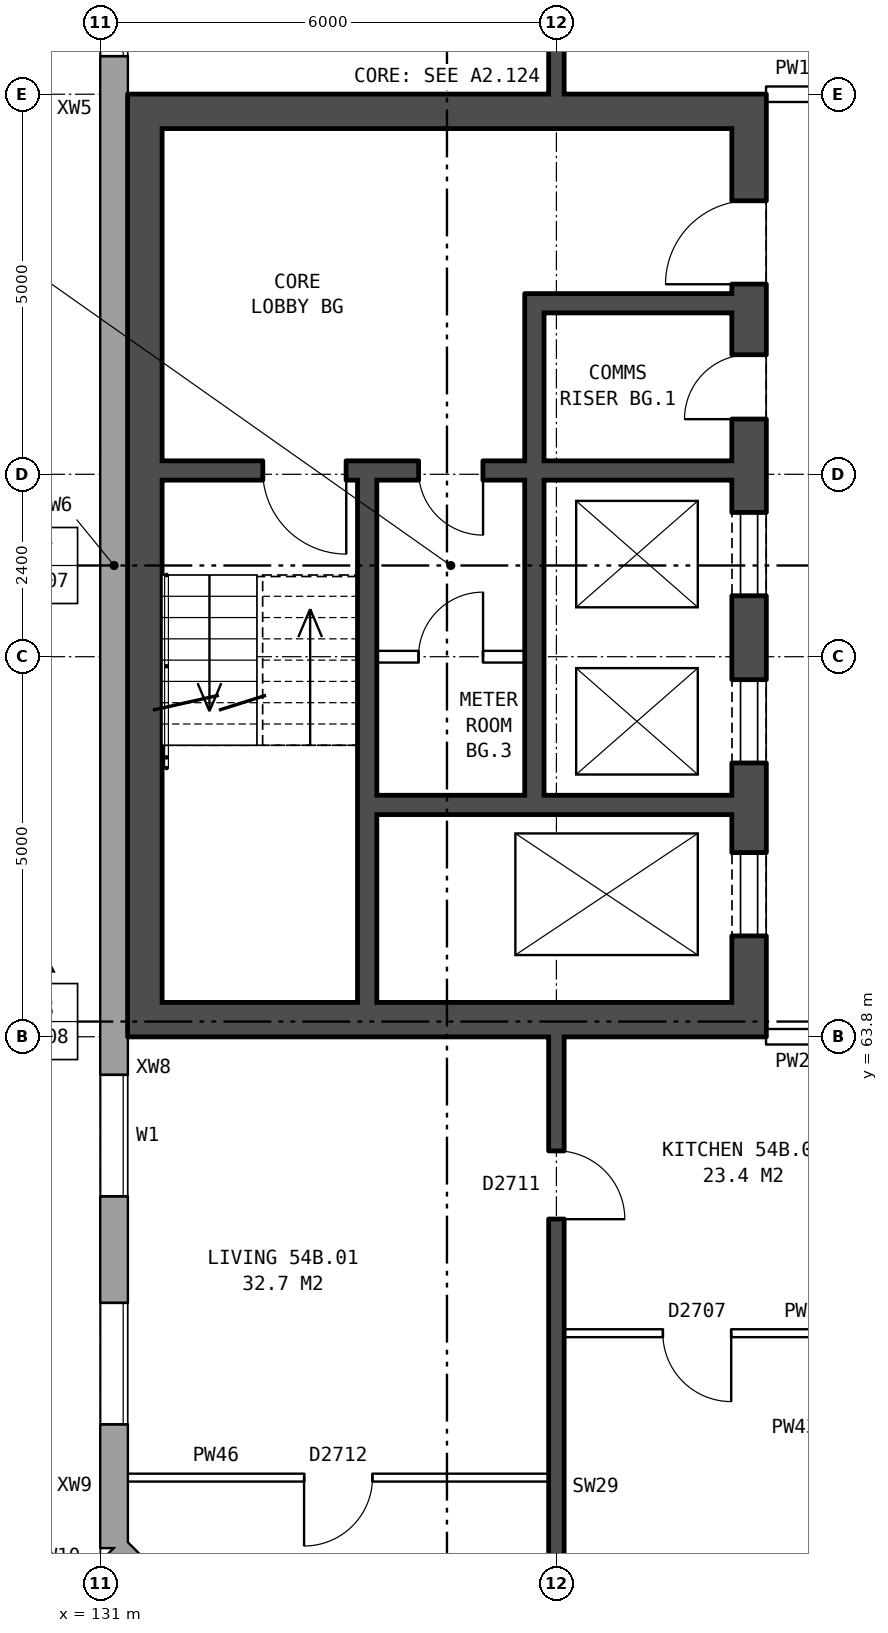
"""IFC4 building model, lengths in metres.
Left out: names, types, materials, properties, quantities, classifications, styles, units other than length and angle.
Written with IfcOpenShell. Run it as: python <this file> out.ifc"""

import sys

from ifc_helpers import new_model, si_unit, direction, frame, frame_2d, origin, place, context, subcontext, project, spatial, rectangle, extrude, element, fill, save


model = new_model("IFC4")
c1 = context("Model", 3, precision=1e-05, world=origin(), true_north=direction((0.0, 1.0)))
c2 = subcontext(c1, "Body", "Model", "MODEL_VIEW")
j1 = project(units=[si_unit("LENGTHUNIT", "METRE"), si_unit("PLANEANGLEUNIT", "RADIAN")], contexts=[c1])
p1 = place(None, origin())
s1 = spatial("IfcSite", under=j1, at=p1, CompositionType="ELEMENT")
p2 = place(p1, origin())
s2 = spatial("IfcBuilding", under=s1, at=p2, CompositionType="ELEMENT")
p3 = place(p2, frame((0.0, 0.0, 191.3)))
s3 = spatial("IfcBuildingStorey", under=s2, at=p3, CompositionType="ELEMENT", Elevation=191.3)
p4 = place(p3, frame((131.18, 57.075, 0.0), z_axis=(0.0, 0.0, 1.0), x_axis=(0.707106781187, -0.707106781187, 0.0)))
e1 = element("IfcWall", 1, at=p4, inside=s3, PredefinedType="STANDARD", context=c2, shape_type="SweptSolid", body=[
    extrude(rectangle(XDim=4.094, YDim=0.36, at=frame_2d((2.047, 0.0))), origin(), (0.0, 0.0, 1.0), 2.85),
])
p5 = place(p4, frame((1.247, 0.0, 0.8)))
e2 = element("IfcOpeningElement", 2, at=p5, cuts=e1, PredefinedType="OPENING", context=c2, shape_type="SweptSolid", body=[
    extrude(rectangle(XDim=1.6, YDim=1.8, at=frame_2d((0.8, 0.9))), frame((0.0, 0.19, 0.0), z_axis=(0.0, -1.0, 0.0), x_axis=(1.0, 0.0, 0.0)), (0.0, 0.0, 1.0), 0.38),
])
p6 = place(p3, frame((131.18, 82.925, 0.0), z_axis=(0.0, 0.0, 1.0), x_axis=(0.0, -1.0, 0.0)))
e3 = element("IfcWall", 3, at=p6, inside=s3, PredefinedType="STANDARD", context=c2, shape_type="SweptSolid", body=[
    extrude(rectangle(XDim=6.522, YDim=0.36, at=frame_2d((3.261, 0.0))), origin(), (0.0, 0.0, 1.0), 2.85),
])
p7 = place(p6, frame((1.625, 0.0, 0.8)))
e4 = element("IfcOpeningElement", 4, at=p7, cuts=e3, PredefinedType="OPENING", context=c2, shape_type="SweptSolid", body=[
    extrude(rectangle(XDim=1.6, YDim=1.8, at=frame_2d((0.8, 0.9))), frame((0.0, 0.19, 0.0), z_axis=(0.0, -1.0, 0.0), x_axis=(1.0, 0.0, 0.0)), (0.0, 0.0, 1.0), 0.38),
])
p8 = place(p6, frame((4.625, 0.0, 0.8)))
e5 = element("IfcOpeningElement", 5, at=p8, cuts=e3, PredefinedType="OPENING", context=c2, shape_type="SweptSolid", body=[
    extrude(rectangle(XDim=1.6, YDim=1.8, at=frame_2d((0.8, 0.9))), frame((0.0, 0.19, 0.0), z_axis=(0.0, -1.0, 0.0), x_axis=(1.0, 0.0, 0.0)), (0.0, 0.0, 1.0), 0.38),
])
p9 = place(p3, frame((131.18, 76.403, 0.0), z_axis=(0.0, 0.0, 1.0), x_axis=(0.0, -1.0, 0.0)))
e6 = element("IfcWall", 6, at=p9, inside=s3, PredefinedType="STANDARD", context=c2, shape_type="SweptSolid", body=[
    extrude(rectangle(XDim=0.806, YDim=0.36, at=frame_2d((0.403, 0.0))), origin(), (0.0, 0.0, 1.0), 1.947),
])
p10 = place(p3, frame((131.18, 75.597, 0.0), z_axis=(0.0, 0.0, 1.0), x_axis=(0.0, -1.0, 0.0)))
e7 = element("IfcWall", 7, at=p10, inside=s3, PredefinedType="STANDARD", context=c2, shape_type="SweptSolid", body=[
    extrude(rectangle(XDim=11.194, YDim=0.36, at=frame_2d((5.597, 0.0))), origin(), (0.0, 0.0, 1.0), 2.85),
])
p11 = place(p3, frame((131.18, 64.403, 0.0), z_axis=(0.0, 0.0, 1.0), x_axis=(0.0, -1.0, 0.0)))
e8 = element("IfcWall", 8, at=p11, inside=s3, PredefinedType="STANDARD", context=c2, shape_type="SweptSolid", body=[
    extrude(rectangle(XDim=0.806, YDim=0.36, at=frame_2d((0.403, 0.0))), origin(), (0.0, 0.0, 1.0), 1.947),
])
p12 = place(p3, frame((131.18, 63.597, 0.0), z_axis=(0.0, 0.0, 1.0), x_axis=(0.0, -1.0, 0.0)))
e9 = element("IfcWall", 9, at=p12, inside=s3, PredefinedType="STANDARD", context=c2, shape_type="SweptSolid", body=[
    extrude(rectangle(XDim=6.522, YDim=0.36, at=frame_2d((3.261, 0.0))), origin(), (0.0, 0.0, 1.0), 2.85),
])
p13 = place(p12, frame((0.297, 0.0, 0.8)))
e10 = element("IfcOpeningElement", 10, at=p13, cuts=e9, PredefinedType="OPENING", context=c2, shape_type="SweptSolid", body=[
    extrude(rectangle(XDim=1.6, YDim=1.8, at=frame_2d((0.8, 0.9))), frame((0.0, 0.19, 0.0), z_axis=(0.0, -1.0, 0.0), x_axis=(1.0, 0.0, 0.0)), (0.0, 0.0, 1.0), 0.38),
])
p14 = place(p12, frame((3.297, 0.0, 0.8)))
e11 = element("IfcOpeningElement", 11, at=p14, cuts=e9, PredefinedType="OPENING", context=c2, shape_type="SweptSolid", body=[
    extrude(rectangle(XDim=1.6, YDim=1.8, at=frame_2d((0.8, 0.9))), frame((0.0, 0.19, 0.0), z_axis=(0.0, -1.0, 0.0), x_axis=(1.0, 0.0, 0.0)), (0.0, 0.0, 1.0), 0.38),
])
p15 = place(p3, frame((139.535, 63.8, 0.0), z_axis=(0.0, 0.0, 1.0), x_axis=(0.0, 1.0, 0.0)))
e12 = element("IfcWall", 12, at=p15, inside=s3, PredefinedType="SHEAR", context=c2, shape_type="SweptSolid", body=[
    extrude(rectangle(XDim=12.4, YDim=0.45, at=frame_2d((6.2, 0.0))), origin(), (0.0, 0.0, 1.0), 2.85),
])
p16 = place(p15, frame((1.325, 0.0, 0.0)))
e13 = element("IfcOpeningElement", 13, at=p16, cuts=e12, PredefinedType="OPENING", context=c2, shape_type="SweptSolid", body=[
    extrude(rectangle(XDim=1.1, YDim=2.1, at=frame_2d((0.55, 1.05))), frame((0.0, 0.235, 0.0), z_axis=(0.0, -1.0, 0.0), x_axis=(1.0, 0.0, 0.0)), (0.0, 0.0, 1.0), 0.47),
])
p17 = place(p15, frame((3.6, 0.0, 0.0)))
e14 = element("IfcOpeningElement", 14, at=p17, cuts=e12, PredefinedType="OPENING", context=c2, shape_type="SweptSolid", body=[
    extrude(rectangle(XDim=1.1, YDim=2.1, at=frame_2d((0.55, 1.05))), frame((0.0, 0.235, 0.0), z_axis=(0.0, -1.0, 0.0), x_axis=(1.0, 0.0, 0.0)), (0.0, 0.0, 1.0), 0.47),
])
p18 = place(p15, frame((5.8, 0.0, 0.0)))
e15 = element("IfcOpeningElement", 15, at=p18, cuts=e12, PredefinedType="OPENING", context=c2, shape_type="SweptSolid", body=[
    extrude(rectangle(XDim=1.1, YDim=2.1, at=frame_2d((0.55, 1.05))), frame((0.0, 0.235, 0.0), z_axis=(0.0, -1.0, 0.0), x_axis=(1.0, 0.0, 0.0)), (0.0, 0.0, 1.0), 0.47),
])
p19 = place(p15, frame((9.9, 0.0, 0.0)))
e16 = element("IfcOpeningElement", 16, at=p19, cuts=e12, PredefinedType="OPENING", context=c2, shape_type="SweptSolid", body=[
    extrude(rectangle(XDim=1.1, YDim=2.1, at=frame_2d((0.55, 1.05))), frame((0.0, 0.235, 0.0), z_axis=(0.0, -1.0, 0.0), x_axis=(1.0, 0.0, 0.0)), (0.0, 0.0, 1.0), 0.47),
])
p20 = place(p15, frame((8.125, 0.0, 0.0)))
e17 = element("IfcOpeningElement", 17, at=p20, cuts=e12, PredefinedType="OPENING", context=c2, shape_type="SweptSolid", body=[
    extrude(rectangle(XDim=0.85, YDim=2.1, at=frame_2d((0.425, 1.05))), frame((0.0, 0.235, 0.0), z_axis=(0.0, -1.0, 0.0), x_axis=(1.0, 0.0, 0.0)), (0.0, 0.0, 1.0), 0.47),
])
p21 = place(p3, frame((131.585, 63.8, 0.0), z_axis=(0.0, 0.0, 1.0), x_axis=(0.0, 1.0, 0.0)))
e18 = element("IfcWall", 18, at=p21, inside=s3, PredefinedType="SHEAR", context=c2, shape_type="SweptSolid", body=[
    extrude(rectangle(XDim=12.4, YDim=0.45, at=frame_2d((6.2, 0.0))), origin(), (0.0, 0.0, 1.0), 2.85),
])
for number, where, z_axis, x_axis in (
    (19, (139.31, 64.025, 0.0), (0.0, 0.0, 1.0), (-1.0, 0.0, 0.0)),
    (20, (139.31, 75.975, 0.0), (0.0, 0.0, 1.0), (-1.0, 0.0, 0.0)),
):
    element("IfcWall", number, at=place(p3, frame(where, z_axis=z_axis, x_axis=x_axis)), inside=s3, PredefinedType="SHEAR", context=c2, shape_type="SweptSolid", body=[
        extrude(rectangle(XDim=7.5, YDim=0.45, at=frame_2d((3.75, 0.0))), origin(), (0.0, 0.0, 1.0), 2.85),
    ])
p22 = place(p3, frame((139.31, 66.85, 0.0), z_axis=(0.0, 0.0, 1.0), x_axis=(-1.0, 0.0, 0.0)))
e21 = element("IfcWall", 21, at=p22, inside=s3, PredefinedType="SHEAR", context=c2, shape_type="SweptSolid", body=[
    extrude(rectangle(XDim=4.675, YDim=0.25, at=frame_2d((2.337, 0.0))), origin(), (0.0, 0.0, 1.0), 2.85),
])
p23 = place(p3, frame((136.585, 68.8, 0.0), z_axis=(0.0, 0.0, 1.0), x_axis=(-1.0, 0.0, 0.0)))
e22 = element("IfcWall", 22, at=p23, inside=s3, PredefinedType="PARTITIONING", context=c2, shape_type="SweptSolid", body=[
    extrude(rectangle(XDim=1.95, YDim=0.15, at=frame_2d((0.975, 0.0))), origin(), (0.0, 0.0, 1.0), 2.85),
])
p24 = place(p23, frame((0.55, 0.0, 0.0)))
e23 = element("IfcOpeningElement", 23, at=p24, cuts=e22, PredefinedType="OPENING", context=c2, shape_type="SweptSolid", body=[
    extrude(rectangle(XDim=0.85, YDim=2.1, at=frame_2d((0.425, 1.05))), frame((0.0, 0.085, 0.0), z_axis=(0.0, -1.0, 0.0), x_axis=(1.0, 0.0, 0.0)), (0.0, 0.0, 1.0), 0.17),
])
p25 = place(p3, frame((139.31, 71.25, 0.0), z_axis=(0.0, 0.0, 1.0), x_axis=(-1.0, 0.0, 0.0)))
e24 = element("IfcWall", 24, at=p25, inside=s3, PredefinedType="SHEAR", context=c2, shape_type="SweptSolid", body=[
    extrude(rectangle(XDim=7.5, YDim=0.25, at=frame_2d((3.75, 0.0))), origin(), (0.0, 0.0, 1.0), 2.85),
])
p26 = place(p25, frame((5.075, 0.0, 0.0)))
e25 = element("IfcOpeningElement", 25, at=p26, cuts=e24, PredefinedType="OPENING", context=c2, shape_type="SweptSolid", body=[
    extrude(rectangle(XDim=1.1, YDim=2.1, at=frame_2d((0.55, 1.05))), frame((0.0, 0.135, 0.0), z_axis=(0.0, -1.0, 0.0), x_axis=(1.0, 0.0, 0.0)), (0.0, 0.0, 1.0), 0.27),
])
p27 = place(p25, frame((3.275, 0.0, 0.0)))
e26 = element("IfcOpeningElement", 26, at=p27, cuts=e24, PredefinedType="OPENING", context=c2, shape_type="SweptSolid", body=[
    extrude(rectangle(XDim=0.85, YDim=2.1, at=frame_2d((0.425, 1.05))), frame((0.0, 0.135, 0.0), z_axis=(0.0, -1.0, 0.0), x_axis=(1.0, 0.0, 0.0)), (0.0, 0.0, 1.0), 0.27),
])
p28 = place(p3, frame((139.31, 73.45, 0.0), z_axis=(0.0, 0.0, 1.0), x_axis=(-1.0, 0.0, 0.0)))
e27 = element("IfcWall", 27, at=p28, inside=s3, PredefinedType="SHEAR", context=c2, shape_type="SweptSolid", body=[
    extrude(rectangle(XDim=2.475, YDim=0.25, at=frame_2d((1.238, 0.0))), origin(), (0.0, 0.0, 1.0), 2.85),
])
p29 = place(p3, frame((136.71, 66.975, 0.0), z_axis=(0.0, 0.0, 1.0), x_axis=(0.0, 1.0, 0.0)))
e28 = element("IfcWall", 28, at=p29, inside=s3, PredefinedType="SHEAR", context=c2, shape_type="SweptSolid", body=[
    extrude(rectangle(XDim=4.15, YDim=0.25, at=frame_2d((2.075, 0.0))), origin(), (0.0, 0.0, 1.0), 2.85),
])
p30 = place(p3, frame((136.71, 71.375, 0.0), z_axis=(0.0, 0.0, 1.0), x_axis=(0.0, 1.0, 0.0)))
e29 = element("IfcWall", 29, at=p30, inside=s3, PredefinedType="SHEAR", context=c2, shape_type="SweptSolid", body=[
    extrude(rectangle(XDim=2.2, YDim=0.25, at=frame_2d((1.1, 0.0))), origin(), (0.0, 0.0, 1.0), 2.85),
])
p31 = place(p3, frame((134.51, 64.25, 0.0), z_axis=(0.0, 0.0, 1.0), x_axis=(0.0, 1.0, 0.0)))
e30 = element("IfcWall", 30, at=p31, inside=s3, PredefinedType="SHEAR", context=c2, shape_type="SweptSolid", body=[
    extrude(rectangle(XDim=6.875, YDim=0.25, at=frame_2d((3.438, 0.0))), origin(), (0.0, 0.0, 1.0), 2.85),
])
p32 = place(p3, frame((131.36, 58.0, 0.0), z_axis=(0.0, 0.0, 1.0), x_axis=(1.0, 0.0, 0.0)))
e31 = element("IfcWall", 31, at=p32, inside=s3, PredefinedType="PARTITIONING", context=c2, shape_type="SweptSolid", body=[
    extrude(rectangle(XDim=5.54, YDim=0.1, at=frame_2d((2.77, 0.0))), origin(), (0.0, 0.0, 1.0), 2.85),
])
p33 = place(p32, frame((2.32, 0.0, 0.0)))
e32 = element("IfcOpeningElement", 32, at=p33, cuts=e31, PredefinedType="OPENING", context=c2, shape_type="SweptSolid", body=[
    extrude(rectangle(XDim=0.9, YDim=2.1, at=frame_2d((0.45, 1.05))), frame((0.0, 0.06, 0.0), z_axis=(0.0, -1.0, 0.0), x_axis=(1.0, 0.0, 0.0)), (0.0, 0.0, 1.0), 0.12),
])
p34 = place(p3, frame((137.1, 59.9, 0.0), z_axis=(0.0, 0.0, 1.0), x_axis=(1.0, 0.0, 0.0)))
e33 = element("IfcWall", 33, at=p34, inside=s3, PredefinedType="PARTITIONING", context=c2, shape_type="SweptSolid", body=[
    extrude(rectangle(XDim=5.8, YDim=0.1, at=frame_2d((2.9, 0.0))), origin(), (0.0, 0.0, 1.0), 2.85),
])
p35 = place(p34, frame((1.3, 0.0, 0.0)))
e34 = element("IfcOpeningElement", 34, at=p35, cuts=e33, PredefinedType="OPENING", context=c2, shape_type="SweptSolid", body=[
    extrude(rectangle(XDim=0.9, YDim=2.1, at=frame_2d((0.45, 1.05))), frame((0.0, 0.06, 0.0), z_axis=(0.0, -1.0, 0.0), x_axis=(1.0, 0.0, 0.0)), (0.0, 0.0, 1.0), 0.12),
])
p36 = place(p34, frame((4.2, 0.0, 0.0)))
e35 = element("IfcOpeningElement", 35, at=p36, cuts=e33, PredefinedType="OPENING", context=c2, shape_type="SweptSolid", body=[
    extrude(rectangle(XDim=0.9, YDim=2.1, at=frame_2d((0.45, 1.05))), frame((0.0, 0.06, 0.0), z_axis=(0.0, -1.0, 0.0), x_axis=(1.0, 0.0, 0.0)), (0.0, 0.0, 1.0), 0.12),
])
p37 = place(p3, frame((139.76, 63.8, 0.0), z_axis=(0.0, 0.0, 1.0), x_axis=(1.0, 0.0, 0.0)))
e36 = element("IfcWall", 36, at=p37, inside=s3, PredefinedType="PARTITIONING", context=c2, shape_type="SweptSolid", body=[
    extrude(rectangle(XDim=3.0, YDim=0.2, at=frame_2d((1.5, 0.0))), origin(), (0.0, 0.0, 1.0), 2.85),
])
p38 = place(p37, frame((1.0, 0.0, 0.0)))
e37 = element("IfcOpeningElement", 37, at=p38, cuts=e36, PredefinedType="OPENING", context=c2, shape_type="SweptSolid", body=[
    extrude(rectangle(XDim=1.0, YDim=2.1, at=frame_2d((0.5, 1.05))), frame((0.0, 0.11, 0.0), z_axis=(0.0, -1.0, 0.0), x_axis=(1.0, 0.0, 0.0)), (0.0, 0.0, 1.0), 0.22),
])
p39 = place(p3, frame((139.76, 76.2, 0.0), z_axis=(0.0, 0.0, 1.0), x_axis=(1.0, 0.0, 0.0)))
e38 = element("IfcWall", 38, at=p39, inside=s3, PredefinedType="PARTITIONING", context=c2, shape_type="SweptSolid", body=[
    extrude(rectangle(XDim=3.0, YDim=0.2, at=frame_2d((1.5, 0.0))), origin(), (0.0, 0.0, 1.0), 2.85),
])
p40 = place(p39, frame((1.0, 0.0, 0.0)))
e39 = element("IfcOpeningElement", 39, at=p40, cuts=e38, PredefinedType="OPENING", context=c2, shape_type="SweptSolid", body=[
    extrude(rectangle(XDim=1.0, YDim=2.1, at=frame_2d((0.5, 1.05))), frame((0.0, 0.11, 0.0), z_axis=(0.0, -1.0, 0.0), x_axis=(1.0, 0.0, 0.0)), (0.0, 0.0, 1.0), 0.22),
])
p41 = place(p3, frame((137.0, 54.36, 0.0), z_axis=(0.0, 0.0, 1.0), x_axis=(0.0, 1.0, 0.0)))
e40 = element("IfcWall", 40, at=p41, inside=s3, PredefinedType="SOLIDWALL", context=c2, shape_type="SweptSolid", body=[
    extrude(rectangle(XDim=9.44, YDim=0.2, at=frame_2d((4.72, 0.0))), origin(), (0.0, 0.0, 1.0), 2.85),
])
p42 = place(p41, frame((7.04, 0.0, 0.0)))
e41 = element("IfcOpeningElement", 41, at=p42, cuts=e40, PredefinedType="OPENING", context=c2, shape_type="SweptSolid", body=[
    extrude(rectangle(XDim=0.9, YDim=2.1, at=frame_2d((0.45, 1.05))), frame((0.0, 0.11, 0.0), z_axis=(0.0, -1.0, 0.0), x_axis=(1.0, 0.0, 0.0)), (0.0, 0.0, 1.0), 0.22),
])
p43 = place(p3, frame((137.0, 76.2, 0.0), z_axis=(0.0, 0.0, 1.0), x_axis=(0.0, 1.0, 0.0)))
e42 = element("IfcWall", 42, at=p43, inside=s3, PredefinedType="SOLIDWALL", context=c2, shape_type="SweptSolid", body=[
    extrude(rectangle(XDim=9.44, YDim=0.2, at=frame_2d((4.72, 0.0))), origin(), (0.0, 0.0, 1.0), 2.85),
])
p44 = place(p43, frame((1.5, 0.0, 0.0)))
e43 = element("IfcOpeningElement", 43, at=p44, cuts=e42, PredefinedType="OPENING", context=c2, shape_type="SweptSolid", body=[
    extrude(rectangle(XDim=0.9, YDim=2.1, at=frame_2d((0.45, 1.05))), frame((0.0, 0.11, 0.0), z_axis=(0.0, -1.0, 0.0), x_axis=(1.0, 0.0, 0.0)), (0.0, 0.0, 1.0), 0.22),
])
p45 = place(p8, origin())
e44 = element("IfcWindow", 44, at=p45, inside=s3, PartitioningType="SINGLE_PANEL", PredefinedType="WINDOW", context=c2, shape_type="SweptSolid", body=[
    extrude(rectangle(XDim=1.6, YDim=1.8, at=frame_2d((0.8, 0.9))), frame((0.0, 0.15, 0.0), z_axis=(0.0, -1.0, 0.0), x_axis=(1.0, 0.0, 0.0)), (0.0, 0.0, 1.0), 0.06),
])
fill(e5, e44)
p46 = place(p13, origin())
e45 = element("IfcWindow", 45, at=p46, inside=s3, PartitioningType="SINGLE_PANEL", PredefinedType="WINDOW", context=c2, shape_type="SweptSolid", body=[
    extrude(rectangle(XDim=1.6, YDim=1.8, at=frame_2d((0.8, 0.9))), frame((0.0, 0.15, 0.0), z_axis=(0.0, -1.0, 0.0), x_axis=(1.0, 0.0, 0.0)), (0.0, 0.0, 1.0), 0.06),
])
fill(e10, e45)
p47 = place(p14, origin())
e46 = element("IfcWindow", 46, at=p47, inside=s3, PartitioningType="SINGLE_PANEL", PredefinedType="WINDOW", context=c2, shape_type="SweptSolid", body=[
    extrude(rectangle(XDim=1.6, YDim=1.8, at=frame_2d((0.8, 0.9))), frame((0.0, 0.15, 0.0), z_axis=(0.0, -1.0, 0.0), x_axis=(1.0, 0.0, 0.0)), (0.0, 0.0, 1.0), 0.06),
])
fill(e11, e46)
p48 = place(p16, origin())
e47 = element("IfcDoor", 47, at=p48, inside=s3, OperationType="DOUBLE_DOOR_SLIDING", PredefinedType="DOOR", context=c2, shape_type="SweptSolid", body=[
    extrude(rectangle(XDim=1.1, YDim=2.1, at=frame_2d((0.55, 1.05))), frame((0.0, 0.21, 0.0), z_axis=(0.0, -1.0, 0.0), x_axis=(1.0, 0.0, 0.0)), (0.0, 0.0, 1.0), 0.05),
])
fill(e13, e47)
p49 = place(p17, origin())
e48 = element("IfcDoor", 48, at=p49, inside=s3, OperationType="DOUBLE_DOOR_SLIDING", PredefinedType="DOOR", context=c2, shape_type="SweptSolid", body=[
    extrude(rectangle(XDim=1.1, YDim=2.1, at=frame_2d((0.55, 1.05))), frame((0.0, 0.21, 0.0), z_axis=(0.0, -1.0, 0.0), x_axis=(1.0, 0.0, 0.0)), (0.0, 0.0, 1.0), 0.05),
])
fill(e14, e48)
p50 = place(p18, origin())
e49 = element("IfcDoor", 49, at=p50, inside=s3, OperationType="DOUBLE_DOOR_SLIDING", PredefinedType="DOOR", context=c2, shape_type="SweptSolid", body=[
    extrude(rectangle(XDim=1.1, YDim=2.1, at=frame_2d((0.55, 1.05))), frame((0.0, 0.21, 0.0), z_axis=(0.0, -1.0, 0.0), x_axis=(1.0, 0.0, 0.0)), (0.0, 0.0, 1.0), 0.05),
])
fill(e15, e49)
p51 = place(p19, origin())
e50 = element("IfcDoor", 50, at=p51, inside=s3, OperationType="SINGLE_SWING_LEFT", PredefinedType="DOOR", context=c2, shape_type="SweptSolid", body=[
    extrude(rectangle(XDim=1.1, YDim=2.1, at=frame_2d((0.55, 1.05))), frame((0.0, 0.21, 0.0), z_axis=(0.0, -1.0, 0.0), x_axis=(1.0, 0.0, 0.0)), (0.0, 0.0, 1.0), 0.05),
])
fill(e16, e50)
p52 = place(p26, origin())
e51 = element("IfcDoor", 51, at=p52, inside=s3, OperationType="SINGLE_SWING_LEFT", PredefinedType="DOOR", context=c2, shape_type="SweptSolid", body=[
    extrude(rectangle(XDim=1.1, YDim=2.1, at=frame_2d((0.55, 1.05))), frame((0.0, 0.025, 0.0), z_axis=(0.0, -1.0, 0.0), x_axis=(1.0, 0.0, 0.0)), (0.0, 0.0, 1.0), 0.05),
])
fill(e25, e51)
p53 = place(p20, origin())
e52 = element("IfcDoor", 52, at=p53, inside=s3, OperationType="SINGLE_SWING_LEFT", PredefinedType="DOOR", context=c2, shape_type="SweptSolid", body=[
    extrude(rectangle(XDim=0.85, YDim=2.1, at=frame_2d((0.425, 1.05))), frame((0.0, 0.21, 0.0), z_axis=(0.0, -1.0, 0.0), x_axis=(1.0, 0.0, 0.0)), (0.0, 0.0, 1.0), 0.05),
])
fill(e17, e52)
p54 = place(p27, origin())
e53 = element("IfcDoor", 53, at=p54, inside=s3, OperationType="SINGLE_SWING_LEFT", PredefinedType="DOOR", context=c2, shape_type="SweptSolid", body=[
    extrude(rectangle(XDim=0.85, YDim=2.1, at=frame_2d((0.425, 1.05))), frame((0.0, 0.025, 0.0), z_axis=(0.0, -1.0, 0.0), x_axis=(1.0, 0.0, 0.0)), (0.0, 0.0, 1.0), 0.05),
])
fill(e26, e53)
p55 = place(p24, frame((0.85, 0.0, 0.0), z_axis=(0.0, 0.0, 1.0), x_axis=(-1.0, 0.0, 0.0)))
e54 = element("IfcDoor", 54, at=p55, inside=s3, OperationType="SINGLE_SWING_RIGHT", PredefinedType="DOOR", context=c2, shape_type="SweptSolid", body=[
    extrude(rectangle(XDim=0.85, YDim=2.1, at=frame_2d((0.425, 1.05))), frame((0.0, 0.025, 0.0), z_axis=(0.0, -1.0, 0.0), x_axis=(1.0, 0.0, 0.0)), (0.0, 0.0, 1.0), 0.05),
])
fill(e23, e54)
p56 = place(p35, frame((0.9, 0.0, 0.0), z_axis=(0.0, 0.0, 1.0), x_axis=(-1.0, 0.0, 0.0)))
e55 = element("IfcDoor", 55, at=p56, inside=s3, OperationType="SINGLE_SWING_LEFT", PredefinedType="DOOR", context=c2, shape_type="SweptSolid", body=[
    extrude(rectangle(XDim=0.9, YDim=2.1, at=frame_2d((0.45, 1.05))), frame((0.0, 0.025, 0.0), z_axis=(0.0, -1.0, 0.0), x_axis=(1.0, 0.0, 0.0)), (0.0, 0.0, 1.0), 0.05),
])
fill(e34, e55)
p57 = place(p33, frame((0.9, 0.0, 0.0), z_axis=(0.0, 0.0, 1.0), x_axis=(-1.0, 0.0, 0.0)))
e56 = element("IfcDoor", 56, at=p57, inside=s3, OperationType="SINGLE_SWING_RIGHT", PredefinedType="DOOR", context=c2, shape_type="SweptSolid", body=[
    extrude(rectangle(XDim=0.9, YDim=2.1, at=frame_2d((0.45, 1.05))), frame((0.0, 0.025, 0.0), z_axis=(0.0, -1.0, 0.0), x_axis=(1.0, 0.0, 0.0)), (0.0, 0.0, 1.0), 0.05),
])
fill(e32, e56)
p58 = place(p42, frame((0.9, 0.0, 0.0), z_axis=(0.0, 0.0, 1.0), x_axis=(-1.0, 0.0, 0.0)))
e57 = element("IfcDoor", 57, at=p58, inside=s3, OperationType="SINGLE_SWING_RIGHT", PredefinedType="DOOR", context=c2, shape_type="SweptSolid", body=[
    extrude(rectangle(XDim=0.9, YDim=2.1, at=frame_2d((0.45, 1.05))), frame((0.0, 0.025, 0.0), z_axis=(0.0, -1.0, 0.0), x_axis=(1.0, 0.0, 0.0)), (0.0, 0.0, 1.0), 0.05),
])
fill(e41, e57)
save(model, sys.argv[1])
